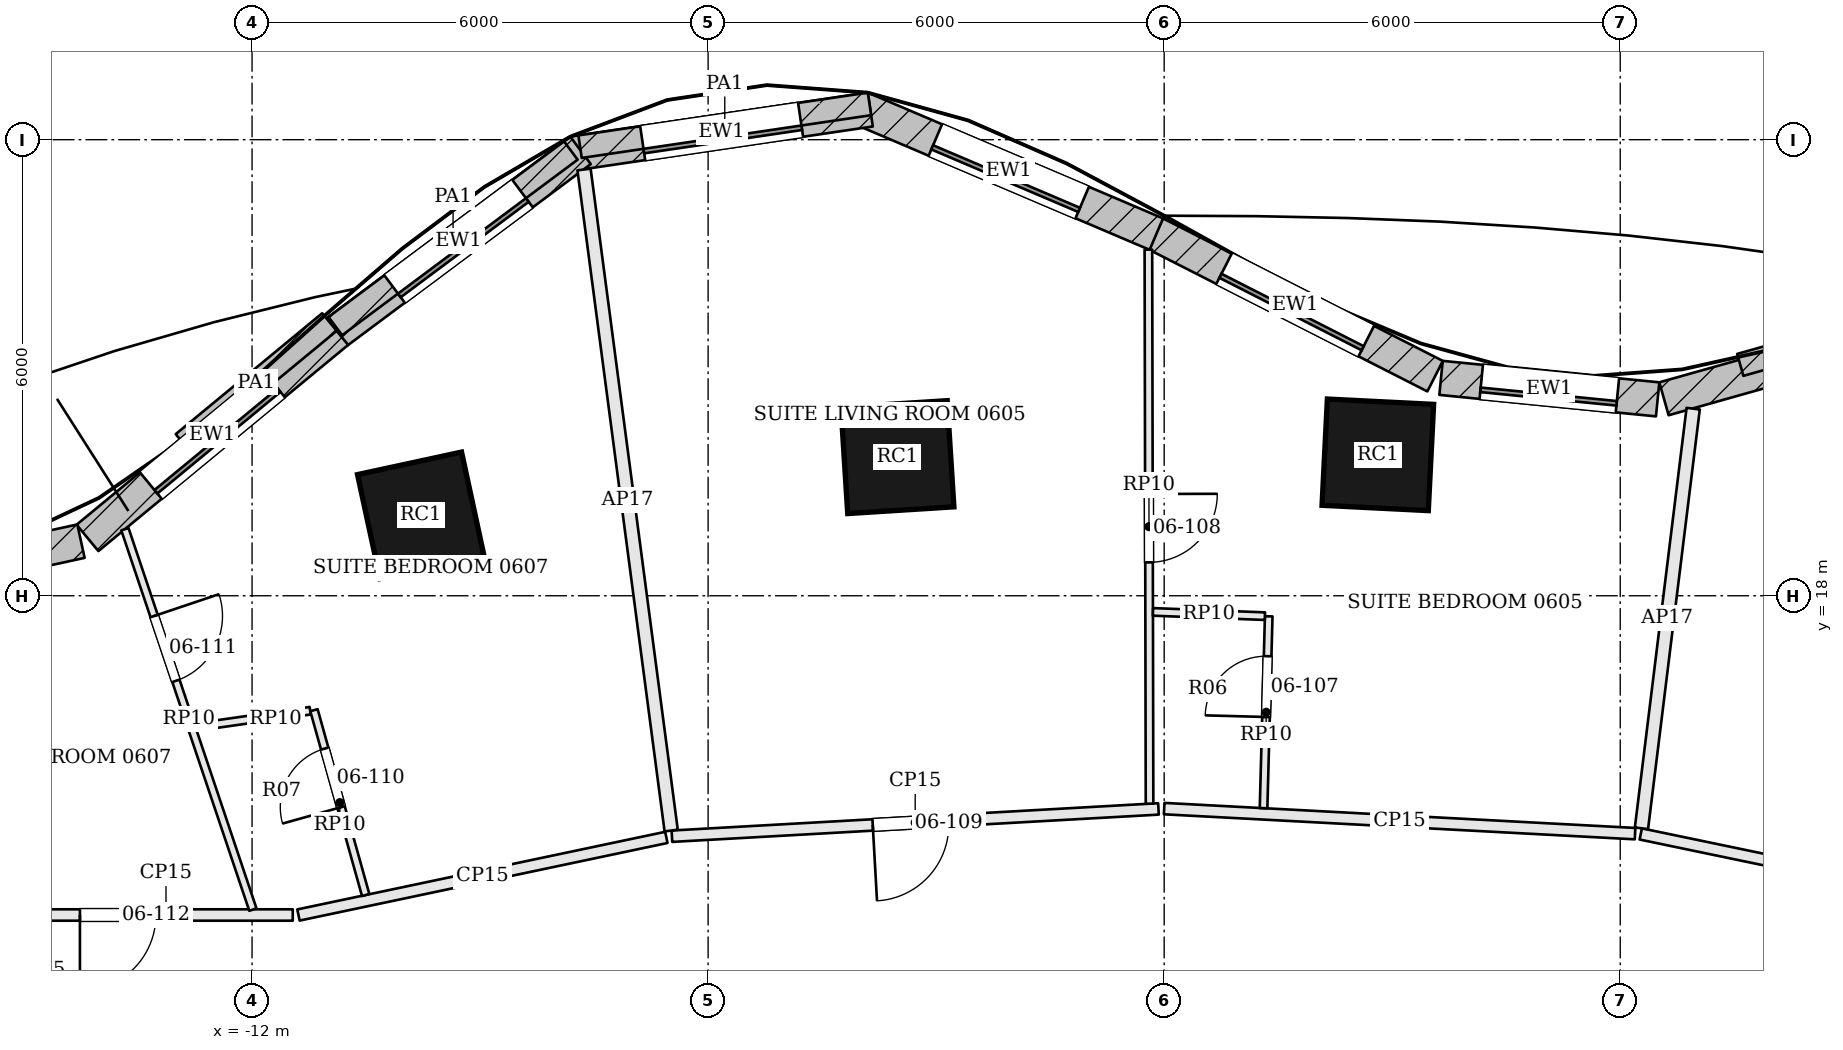
"""IFC4 building model, lengths in metres.
Left out: names, types, materials, properties, quantities, classifications, styles, units other than length and angle.
Written with IfcOpenShell. Run it as: python <this file> out.ifc"""

import sys

from ifc_helpers import new_model, si_unit, direction, frame, frame_2d, origin, origin_2d, place, context, subcontext, project, spatial, rectangle, extrude, element, fill, save


model = new_model("IFC4")
c1 = context("Model", 3, precision=1e-05, world=origin(), true_north=direction((0.0, 1.0)))
c2 = subcontext(c1, "Body", "Model", "MODEL_VIEW")
j1 = project(units=[si_unit("LENGTHUNIT", "METRE"), si_unit("PLANEANGLEUNIT", "RADIAN")], contexts=[c1])
p1 = place(None, origin())
s1 = spatial("IfcSite", under=j1, at=p1, CompositionType="ELEMENT")
p2 = place(p1, origin())
s2 = spatial("IfcBuilding", under=s1, at=p2, CompositionType="ELEMENT")
p3 = place(p2, frame((0.0, 0.0, 37.5)))
s3 = spatial("IfcBuildingStorey", under=s2, at=p3, CompositionType="ELEMENT", Elevation=37.5)
for number, where, z_axis, x_axis in (
    (1, (2.811, 19.854, 0.0), (0.0, 0.0, 1.0), (-0.999, 0.05, 0.0)),
    (2, (-3.509, 19.824, 0.0), (0.0, 0.0, 1.0), (-0.998, -0.063, 0.0)),
    (3, (-9.78, 19.058, 0.0), (0.0, 0.0, 1.0), (-0.977, -0.211, 0.0)),
):
    element("IfcColumn", number, at=place(p3, frame(where, z_axis=z_axis, x_axis=x_axis)), inside=s3, PredefinedType="COLUMN", context=c2, shape_type="SweptSolid", body=[
        extrude(rectangle(XDim=1.4, YDim=1.4, at=origin_2d()), origin(), (0.0, 0.0, 1.0), 3.6),
    ])
p4 = place(p3, frame((11.732, 22.044, 0.0), z_axis=(0.0, 0.0, 1.0), x_axis=(-0.962535416232, -0.271155992925, 0.0)))
e4 = element("IfcWall", 4, at=p4, inside=s3, PredefinedType="SOLIDWALL", context=c2, shape_type="SweptSolid", body=[
    extrude(rectangle(XDim=5.357, YDim=0.45, at=frame_2d((2.679, 0.0))), origin(), (0.0, 0.0, 1.0), 3.4),
])
p5 = place(p4, frame((1.629, 0.0, 0.9)))
e5 = element("IfcOpeningElement", 5, at=p5, cuts=e4, PredefinedType="OPENING", context=c2, shape_type="SweptSolid", body=[
    extrude(rectangle(XDim=2.1, YDim=2.0, at=frame_2d((1.05, 1.0))), frame((0.0, 0.235, 0.0), z_axis=(0.0, -1.0, 0.0), x_axis=(1.0, 0.0, 0.0)), (0.0, 0.0, 1.0), 0.47),
])
p6 = place(p3, frame((6.492, 20.584, 0.0), z_axis=(0.0, 0.0, 1.0), x_axis=(-0.995123748575, 0.098634299418, 0.0)))
e6 = element("IfcWall", 6, at=p6, inside=s3, PredefinedType="SOLIDWALL", context=c2, shape_type="SweptSolid", body=[
    extrude(rectangle(XDim=2.864, YDim=0.45, at=frame_2d((1.432, 0.0))), origin(), (0.0, 0.0, 1.0), 3.4),
])
p7 = place(p6, frame((0.532, 0.0, 0.9)))
e7 = element("IfcOpeningElement", 7, at=p7, cuts=e6, PredefinedType="OPENING", context=c2, shape_type="SweptSolid", body=[
    extrude(rectangle(XDim=1.8, YDim=2.0, at=frame_2d((0.9, 1.0))), frame((0.0, 0.235, 0.0), z_axis=(0.0, -1.0, 0.0), x_axis=(1.0, 0.0, 0.0)), (0.0, 0.0, 1.0), 0.47),
])
p8 = place(p3, frame((3.564, 20.889, 0.0), z_axis=(0.0, 0.0, 1.0), x_axis=(-0.891033634447, 0.453937288933, 0.0)))
e8 = element("IfcWall", 8, at=p8, inside=s3, PredefinedType="SOLIDWALL", context=c2, shape_type="SweptSolid", body=[
    extrude(rectangle(XDim=4.132, YDim=0.45, at=frame_2d((2.066, 0.0))), origin(), (0.0, 0.0, 1.0), 3.4),
])
p9 = place(p8, frame((1.016, 0.0, 0.9)))
e9 = element("IfcOpeningElement", 9, at=p9, cuts=e8, PredefinedType="OPENING", context=c2, shape_type="SweptSolid", body=[
    extrude(rectangle(XDim=2.1, YDim=2.0, at=frame_2d((1.05, 1.0))), frame((0.0, 0.235, 0.0), z_axis=(0.0, -1.0, 0.0), x_axis=(1.0, 0.0, 0.0)), (0.0, 0.0, 1.0), 0.47),
])
p10 = place(p3, frame((-0.103, 22.758, 0.0), z_axis=(0.0, 0.0, 1.0), x_axis=(-0.920037498786, 0.391830321475, 0.0)))
e10 = element("IfcWall", 10, at=p10, inside=s3, PredefinedType="SOLIDWALL", context=c2, shape_type="SweptSolid", body=[
    extrude(rectangle(XDim=4.219, YDim=0.45, at=frame_2d((2.11, 0.0))), origin(), (0.0, 0.0, 1.0), 3.4),
])
p11 = place(p10, frame((1.06, 0.0, 0.9)))
e11 = element("IfcOpeningElement", 11, at=p11, cuts=e10, PredefinedType="OPENING", context=c2, shape_type="SweptSolid", body=[
    extrude(rectangle(XDim=2.1, YDim=2.0, at=frame_2d((1.05, 1.0))), frame((0.0, 0.235, 0.0), z_axis=(0.0, -1.0, 0.0), x_axis=(1.0, 0.0, 0.0)), (0.0, 0.0, 1.0), 0.47),
])
p12 = place(p3, frame((-3.866, 24.396, 0.0), z_axis=(0.0, 0.0, 1.0), x_axis=(-0.989255112942, -0.146199594798, 0.0)))
e12 = element("IfcWall", 12, at=p12, inside=s3, PredefinedType="SOLIDWALL", context=c2, shape_type="SweptSolid", body=[
    extrude(rectangle(XDim=3.954, YDim=0.45, at=frame_2d((1.977, 0.0))), origin(), (0.0, 0.0, 1.0), 3.4),
])
p13 = place(p12, frame((0.927, 0.0, 0.9)))
e13 = element("IfcOpeningElement", 13, at=p13, cuts=e12, PredefinedType="OPENING", context=c2, shape_type="SweptSolid", body=[
    extrude(rectangle(XDim=2.1, YDim=2.0, at=frame_2d((1.05, 1.0))), frame((0.0, 0.235, 0.0), z_axis=(0.0, -1.0, 0.0), x_axis=(1.0, 0.0, 0.0)), (0.0, 0.0, 1.0), 0.47),
])
p14 = place(p3, frame((-7.678, 23.859, 0.0), z_axis=(0.0, 0.0, 1.0), x_axis=(-0.801665619573, -0.597772728046, 0.0)))
e14 = element("IfcWall", 14, at=p14, inside=s3, PredefinedType="SOLIDWALL", context=c2, shape_type="SweptSolid", body=[
    extrude(rectangle(XDim=4.003, YDim=0.45, at=frame_2d((2.001, 0.0))), origin(), (0.0, 0.0, 1.0), 3.4),
])
p15 = place(p14, frame((0.951, 0.0, 0.9)))
e15 = element("IfcOpeningElement", 15, at=p15, cuts=e14, PredefinedType="OPENING", context=c2, shape_type="SweptSolid", body=[
    extrude(rectangle(XDim=2.1, YDim=2.0, at=frame_2d((1.05, 1.0))), frame((0.0, 0.235, 0.0), z_axis=(0.0, -1.0, 0.0), x_axis=(1.0, 0.0, 0.0)), (0.0, 0.0, 1.0), 0.47),
])
p16 = place(p3, frame((-10.879, 21.473, 0.0), z_axis=(0.0, 0.0, 1.0), x_axis=(-0.77124668946, -0.636536365023, 0.0)))
e16 = element("IfcWall", 16, at=p16, inside=s3, PredefinedType="SOLIDWALL", context=c2, shape_type="SweptSolid", body=[
    extrude(rectangle(XDim=4.261, YDim=0.45, at=frame_2d((2.13, 0.0))), origin(), (0.0, 0.0, 1.0), 3.4),
])
p17 = place(p16, frame((1.08, 0.0, 0.9)))
e17 = element("IfcOpeningElement", 17, at=p17, cuts=e16, PredefinedType="OPENING", context=c2, shape_type="SweptSolid", body=[
    extrude(rectangle(XDim=2.1, YDim=2.0, at=frame_2d((1.05, 1.0))), frame((0.0, 0.235, 0.0), z_axis=(0.0, -1.0, 0.0), x_axis=(1.0, 0.0, 0.0)), (0.0, 0.0, 1.0), 0.47),
])
p18 = place(p3, frame((-14.251, 18.718, 0.0), z_axis=(0.0, 0.0, 1.0), x_axis=(-0.976903627618, -0.213680374267, 0.0)))
e18 = element("IfcWall", 18, at=p18, inside=s3, PredefinedType="SOLIDWALL", context=c2, shape_type="SweptSolid", body=[
    extrude(rectangle(XDim=3.97, YDim=0.45, at=frame_2d((1.985, 0.0))), origin(), (0.0, 0.0, 1.0), 3.4),
])
p19 = place(p18, frame((1.085, 0.0, 0.9)))
e19 = element("IfcOpeningElement", 19, at=p19, cuts=e18, PredefinedType="OPENING", context=c2, shape_type="SweptSolid", body=[
    extrude(rectangle(XDim=1.8, YDim=2.0, at=frame_2d((0.9, 1.0))), frame((0.0, 0.235, 0.0), z_axis=(0.0, -1.0, 0.0), x_axis=(1.0, 0.0, 0.0)), (0.0, 0.0, 1.0), 0.47),
])
p20 = place(p3, frame((11.314, 22.089, 3.6), z_axis=(0.0, 0.0, 1.0), x_axis=(-0.962524249835, -0.271195627691, 0.0)))
e20 = element("IfcWall", 20, at=p20, inside=s3, PredefinedType="PARAPET", context=c2, shape_type="SweptSolid", body=[
    extrude(rectangle(XDim=3.88, YDim=0.3, at=frame_2d((1.94, 0.0))), origin(), (0.0, 0.0, 1.0), 1.1),
])
p21 = place(p3, frame((-3.877, 24.471, 3.6), z_axis=(0.0, 0.0, 1.0), x_axis=(-0.989252791024, -0.146215305118, 0.0)))
e21 = element("IfcWall", 21, at=p21, inside=s3, PredefinedType="PARAPET", context=c2, shape_type="SweptSolid", body=[
    extrude(rectangle(XDim=3.849, YDim=0.3, at=frame_2d((1.924, 0.0))), origin(), (0.0, 0.0, 1.0), 1.1),
])
p22 = place(p3, frame((-7.806, 23.858, 3.6), z_axis=(0.0, 0.0, 1.0), x_axis=(-0.801649538596, -0.597794293439, 0.0)))
e22 = element("IfcWall", 22, at=p22, inside=s3, PredefinedType="PARAPET", context=c2, shape_type="SweptSolid", body=[
    extrude(rectangle(XDim=3.865, YDim=0.3, at=frame_2d((1.932, 0.0))), origin(), (0.0, 0.0, 1.0), 1.1),
])
p23 = place(p3, frame((-10.982, 21.601, 3.6), z_axis=(0.0, 0.0, 1.0), x_axis=(-0.771295342686, -0.636477410715, 0.0)))
e23 = element("IfcWall", 23, at=p23, inside=s3, PredefinedType="PARAPET", context=c2, shape_type="SweptSolid", body=[
    extrude(rectangle(XDim=2.499, YDim=0.3, at=frame_2d((1.25, 0.0))), origin(), (0.0, 0.0, 1.0), 1.1),
])
p24 = place(p3, frame((11.316, 13.815, 0.0), z_axis=(0.0, 0.0, 1.0), x_axis=(-0.978978843439, 0.203961820198, 0.0)))
e24 = element("IfcWall", 24, at=p24, inside=s3, PredefinedType="PARTITIONING", context=c2, shape_type="SweptSolid", body=[
    extrude(rectangle(XDim=5.154, YDim=0.15, at=frame_2d((2.577, 0.0))), origin(), (0.0, 0.0, 1.0), 2.68),
])
p25 = place(p3, frame((6.96, 20.462, 0.0), z_axis=(0.0, 0.0, 1.0), x_axis=(-0.122322154521, -0.992490448575, 0.0)))
e25 = element("IfcWall", 25, at=p25, inside=s3, PredefinedType="PARTITIONING", context=c2, shape_type="SweptSolid", body=[
    extrude(rectangle(XDim=5.562, YDim=0.175, at=frame_2d((2.781, 0.0))), origin(), (0.0, 0.0, 1.0), 2.68),
])
p26 = place(p3, frame((6.195, 14.87, 0.0), z_axis=(0.0, 0.0, 1.0), x_axis=(-0.99858788346, 0.053124749475, 0.0)))
e26 = element("IfcWall", 26, at=p26, inside=s3, PredefinedType="PARTITIONING", context=c2, shape_type="SweptSolid", body=[
    extrude(rectangle(XDim=6.204, YDim=0.15, at=frame_2d((3.102, 0.0))), origin(), (0.0, 0.0, 1.0), 2.68),
])
p27 = place(p3, frame((-0.075, 15.196, 0.0), z_axis=(0.0, 0.0, 1.0), x_axis=(-0.998427726148, -0.056054220714, 0.0)))
e27 = element("IfcWall", 27, at=p27, inside=s3, PredefinedType="PARTITIONING", context=c2, shape_type="SweptSolid", body=[
    extrude(rectangle(XDim=6.411, YDim=0.15, at=frame_2d((3.206, 0.0))), origin(), (0.0, 0.0, 1.0), 2.68),
])
p28 = place(p27, frame((2.765, 0.0, 0.0)))
e28 = element("IfcOpeningElement", 28, at=p28, cuts=e27, PredefinedType="OPENING", context=c2, shape_type="SweptSolid", body=[
    extrude(rectangle(XDim=1.0, YDim=2.1, at=frame_2d((0.5, 1.05))), frame((0.0, 0.085, 0.0), z_axis=(0.0, -1.0, 0.0), x_axis=(1.0, 0.0, 0.0)), (0.0, 0.0, 1.0), 0.17),
])
p29 = place(p3, frame((-7.633, 23.608, 0.0), z_axis=(0.0, 0.0, 1.0), x_axis=(0.130721600839, -0.99141911575, 0.0)))
e29 = element("IfcWall", 29, at=p29, inside=s3, PredefinedType="PARTITIONING", context=c2, shape_type="SweptSolid", body=[
    extrude(rectangle(XDim=8.772, YDim=0.175, at=frame_2d((4.386, 0.0))), origin(), (0.0, 0.0, 1.0), 2.68),
])
p30 = place(p3, frame((-6.55, 14.821, 0.0), z_axis=(0.0, 0.0, 1.0), x_axis=(-0.978464864562, -0.206413441465, 0.0)))
e30 = element("IfcWall", 30, at=p30, inside=s3, PredefinedType="PARTITIONING", context=c2, shape_type="SweptSolid", body=[
    extrude(rectangle(XDim=4.946, YDim=0.15, at=frame_2d((2.473, 0.0))), origin(), (0.0, 0.0, 1.0), 2.68),
])
p31 = place(p3, frame((-11.464, 13.8, 0.0), z_axis=(0.0, 0.0, 1.0), x_axis=(-1.0, 0.0, 0.0)))
e31 = element("IfcWall", 31, at=p31, inside=s3, PredefinedType="PARTITIONING", context=c2, shape_type="SweptSolid", body=[
    extrude(rectangle(XDim=3.336, YDim=0.15, at=frame_2d((1.668, 0.0))), origin(), (0.0, 0.0, 1.0), 2.68),
])
p32 = place(p31, frame((1.8, 0.0, 0.0)))
e32 = element("IfcOpeningElement", 32, at=p32, cuts=e31, PredefinedType="OPENING", context=c2, shape_type="SweptSolid", body=[
    extrude(rectangle(XDim=1.0, YDim=2.1, at=frame_2d((0.5, 1.05))), frame((0.0, 0.085, 0.0), z_axis=(0.0, -1.0, 0.0), x_axis=(1.0, 0.0, 0.0)), (0.0, 0.0, 1.0), 0.17),
])
p33 = place(p3, frame((-0.208, 22.553, 0.0), z_axis=(0.0, 0.0, 1.0), x_axis=(0.002076769153, -0.999997843513, 0.0)))
e33 = element("IfcWall", 33, at=p33, inside=s3, PredefinedType="PARTITIONING", context=c2, shape_type="SweptSolid", body=[
    extrude(rectangle(XDim=7.289, YDim=0.1, at=frame_2d((3.644, 0.0))), origin(), (0.0, 0.0, 1.0), 2.884),
])
p34 = place(p33, frame((3.214, 0.0, 0.0)))
e34 = element("IfcOpeningElement", 34, at=p34, cuts=e33, PredefinedType="OPENING", context=c2, shape_type="SweptSolid", body=[
    extrude(rectangle(XDim=0.9, YDim=2.4, at=frame_2d((0.45, 1.2))), frame((0.0, 0.06, 0.0), z_axis=(0.0, -1.0, 0.0), x_axis=(1.0, 0.0, 0.0)), (0.0, 0.0, 1.0), 0.12),
])
p35 = place(p3, frame((1.308, 15.206, 0.0), z_axis=(0.0, 0.0, 1.0), x_axis=(0.026784737783, 0.999641224551, 0.0)))
e35 = element("IfcWall", 35, at=p35, inside=s3, PredefinedType="PARTITIONING", context=c2, shape_type="SweptSolid", body=[
    extrude(rectangle(XDim=2.525, YDim=0.1, at=frame_2d((1.262, 0.0))), origin(), (0.0, 0.0, 1.0), 2.884),
])
p36 = place(p35, frame((1.2, 0.0, 0.0)))
e36 = element("IfcOpeningElement", 36, at=p36, cuts=e35, PredefinedType="OPENING", context=c2, shape_type="SweptSolid", body=[
    extrude(rectangle(XDim=0.8, YDim=2.1, at=frame_2d((0.4, 1.05))), frame((0.0, 0.06, 0.0), z_axis=(0.0, -1.0, 0.0), x_axis=(1.0, 0.0, 0.0)), (0.0, 0.0, 1.0), 0.12),
])
p37 = place(p3, frame((1.325, 17.731, 0.0), z_axis=(0.0, 0.0, 1.0), x_axis=(-0.999267765644, 0.038261371434, 0.0)))
e37 = element("IfcWall", 37, at=p37, inside=s3, PredefinedType="PARTITIONING", context=c2, shape_type="SweptSolid", body=[
    extrude(rectangle(XDim=1.474, YDim=0.1, at=frame_2d((0.737, 0.0))), origin(), (0.0, 0.0, 1.0), 2.884),
])
p38 = place(p3, frame((-13.673, 18.876, 0.0), z_axis=(0.0, 0.0, 1.0), x_axis=(0.318889713753, -0.947791828654, 0.0)))
e38 = element("IfcWall", 38, at=p38, inside=s3, PredefinedType="PARTITIONING", context=c2, shape_type="SweptSolid", body=[
    extrude(rectangle(XDim=5.28, YDim=0.1, at=frame_2d((2.64, 0.0))), origin(), (0.0, 0.0, 1.0), 2.884),
])
p39 = place(p38, frame((1.205, 0.0, 0.0)))
e39 = element("IfcOpeningElement", 39, at=p39, cuts=e38, PredefinedType="OPENING", context=c2, shape_type="SweptSolid", body=[
    extrude(rectangle(XDim=0.9, YDim=2.4, at=frame_2d((0.45, 1.2))), frame((0.0, 0.06, 0.0), z_axis=(0.0, -1.0, 0.0), x_axis=(1.0, 0.0, 0.0)), (0.0, 0.0, 1.0), 0.12),
])
p40 = place(p3, frame((-10.505, 14.063, 0.0), z_axis=(0.0, 0.0, 1.0), x_axis=(-0.269378866163, 0.963034281043, 0.0)))
e40 = element("IfcWall", 40, at=p40, inside=s3, PredefinedType="PARTITIONING", context=c2, shape_type="SweptSolid", body=[
    extrude(rectangle(XDim=2.525, YDim=0.1, at=frame_2d((1.262, 0.0))), origin(), (0.0, 0.0, 1.0), 2.884),
])
p41 = place(p40, frame((1.2, 0.0, 0.0)))
e41 = element("IfcOpeningElement", 41, at=p41, cuts=e40, PredefinedType="OPENING", context=c2, shape_type="SweptSolid", body=[
    extrude(rectangle(XDim=0.8, YDim=2.1, at=frame_2d((0.4, 1.05))), frame((0.0, 0.06, 0.0), z_axis=(0.0, -1.0, 0.0), x_axis=(1.0, 0.0, 0.0)), (0.0, 0.0, 1.0), 0.12),
])
p42 = place(p3, frame((-11.235, 16.488, 0.0), z_axis=(0.0, 0.0, 1.0), x_axis=(-0.989914246095, -0.141667869954, 0.0)))
e42 = element("IfcWall", 42, at=p42, inside=s3, PredefinedType="PARTITIONING", context=c2, shape_type="SweptSolid", body=[
    extrude(rectangle(XDim=1.525, YDim=0.1, at=frame_2d((0.763, 0.0))), origin(), (0.0, 0.0, 1.0), 2.884),
])
p43 = place(p7, origin())
e43 = element("IfcWindow", 43, at=p43, inside=s3, PartitioningType="SINGLE_PANEL", PredefinedType="WINDOW", context=c2, shape_type="SweptSolid", body=[
    extrude(rectangle(XDim=1.8, YDim=2.0, at=frame_2d((0.9, 1.0))), frame((0.0, 0.135, 0.0), z_axis=(0.0, -1.0, 0.0), x_axis=(1.0, 0.0, 0.0)), (0.0, 0.0, 1.0), 0.06),
])
fill(e7, e43)
p44 = place(p9, origin())
e44 = element("IfcWindow", 44, at=p44, inside=s3, PartitioningType="SINGLE_PANEL", PredefinedType="WINDOW", context=c2, shape_type="SweptSolid", body=[
    extrude(rectangle(XDim=2.1, YDim=2.0, at=frame_2d((1.05, 1.0))), frame((0.0, 0.135, 0.0), z_axis=(0.0, -1.0, 0.0), x_axis=(1.0, 0.0, 0.0)), (0.0, 0.0, 1.0), 0.06),
])
fill(e9, e44)
p45 = place(p11, origin())
e45 = element("IfcWindow", 45, at=p45, inside=s3, PartitioningType="SINGLE_PANEL", PredefinedType="WINDOW", context=c2, shape_type="SweptSolid", body=[
    extrude(rectangle(XDim=2.1, YDim=2.0, at=frame_2d((1.05, 1.0))), frame((0.0, 0.135, 0.0), z_axis=(0.0, -1.0, 0.0), x_axis=(1.0, 0.0, 0.0)), (0.0, 0.0, 1.0), 0.06),
])
fill(e11, e45)
p46 = place(p13, origin())
e46 = element("IfcWindow", 46, at=p46, inside=s3, PartitioningType="SINGLE_PANEL", PredefinedType="WINDOW", context=c2, shape_type="SweptSolid", body=[
    extrude(rectangle(XDim=2.1, YDim=2.0, at=frame_2d((1.05, 1.0))), frame((0.0, 0.135, 0.0), z_axis=(0.0, -1.0, 0.0), x_axis=(1.0, 0.0, 0.0)), (0.0, 0.0, 1.0), 0.06),
])
fill(e13, e46)
p47 = place(p15, origin())
e47 = element("IfcWindow", 47, at=p47, inside=s3, PartitioningType="SINGLE_PANEL", PredefinedType="WINDOW", context=c2, shape_type="SweptSolid", body=[
    extrude(rectangle(XDim=2.1, YDim=2.0, at=frame_2d((1.05, 1.0))), frame((0.0, 0.135, 0.0), z_axis=(0.0, -1.0, 0.0), x_axis=(1.0, 0.0, 0.0)), (0.0, 0.0, 1.0), 0.06),
])
fill(e15, e47)
p48 = place(p17, origin())
e48 = element("IfcWindow", 48, at=p48, inside=s3, PartitioningType="SINGLE_PANEL", PredefinedType="WINDOW", context=c2, shape_type="SweptSolid", body=[
    extrude(rectangle(XDim=2.1, YDim=2.0, at=frame_2d((1.05, 1.0))), frame((0.0, 0.135, 0.0), z_axis=(0.0, -1.0, 0.0), x_axis=(1.0, 0.0, 0.0)), (0.0, 0.0, 1.0), 0.06),
])
fill(e17, e48)
p49 = place(p36, origin())
e49 = element("IfcDoor", 49, at=p49, inside=s3, OperationType="SINGLE_SWING_LEFT", PredefinedType="DOOR", context=c2, shape_type="SweptSolid", body=[
    extrude(rectangle(XDim=0.8, YDim=2.1, at=frame_2d((0.4, 1.05))), frame((0.0, 0.025, 0.0), z_axis=(0.0, -1.0, 0.0), x_axis=(1.0, 0.0, 0.0)), (0.0, 0.0, 1.0), 0.05),
])
fill(e36, e49)
p50 = place(p34, origin())
e50 = element("IfcDoor", 50, at=p50, inside=s3, OperationType="SINGLE_SWING_LEFT", PredefinedType="DOOR", context=c2, shape_type="SweptSolid", body=[
    extrude(rectangle(XDim=0.9, YDim=2.4, at=frame_2d((0.45, 1.2))), frame((0.0, 0.025, 0.0), z_axis=(0.0, -1.0, 0.0), x_axis=(1.0, 0.0, 0.0)), (0.0, 0.0, 1.0), 0.05),
])
fill(e34, e50)
p51 = place(p28, origin())
e51 = element("IfcDoor", 51, at=p51, inside=s3, OperationType="SINGLE_SWING_RIGHT", PredefinedType="DOOR", context=c2, shape_type="SweptSolid", body=[
    extrude(rectangle(XDim=1.0, YDim=2.1, at=frame_2d((0.5, 1.05))), frame((0.0, 0.025, 0.0), z_axis=(0.0, -1.0, 0.0), x_axis=(1.0, 0.0, 0.0)), (0.0, 0.0, 1.0), 0.05),
])
fill(e28, e51)
p52 = place(p41, origin())
e52 = element("IfcDoor", 52, at=p52, inside=s3, OperationType="SINGLE_SWING_LEFT", PredefinedType="DOOR", context=c2, shape_type="SweptSolid", body=[
    extrude(rectangle(XDim=0.8, YDim=2.1, at=frame_2d((0.4, 1.05))), frame((0.0, 0.025, 0.0), z_axis=(0.0, -1.0, 0.0), x_axis=(1.0, 0.0, 0.0)), (0.0, 0.0, 1.0), 0.05),
])
fill(e41, e52)
p53 = place(p39, origin())
e53 = element("IfcDoor", 53, at=p53, inside=s3, OperationType="SINGLE_SWING_LEFT", PredefinedType="DOOR", context=c2, shape_type="SweptSolid", body=[
    extrude(rectangle(XDim=0.9, YDim=2.4, at=frame_2d((0.45, 1.2))), frame((0.0, 0.025, 0.0), z_axis=(0.0, -1.0, 0.0), x_axis=(1.0, 0.0, 0.0)), (0.0, 0.0, 1.0), 0.05),
])
fill(e39, e53)
p54 = place(p32, origin())
e54 = element("IfcDoor", 54, at=p54, inside=s3, OperationType="SINGLE_SWING_RIGHT", PredefinedType="DOOR", context=c2, shape_type="SweptSolid", body=[
    extrude(rectangle(XDim=1.0, YDim=2.1, at=frame_2d((0.5, 1.05))), frame((0.0, 0.025, 0.0), z_axis=(0.0, -1.0, 0.0), x_axis=(1.0, 0.0, 0.0)), (0.0, 0.0, 1.0), 0.05),
])
fill(e32, e54)
save(model, sys.argv[1])
